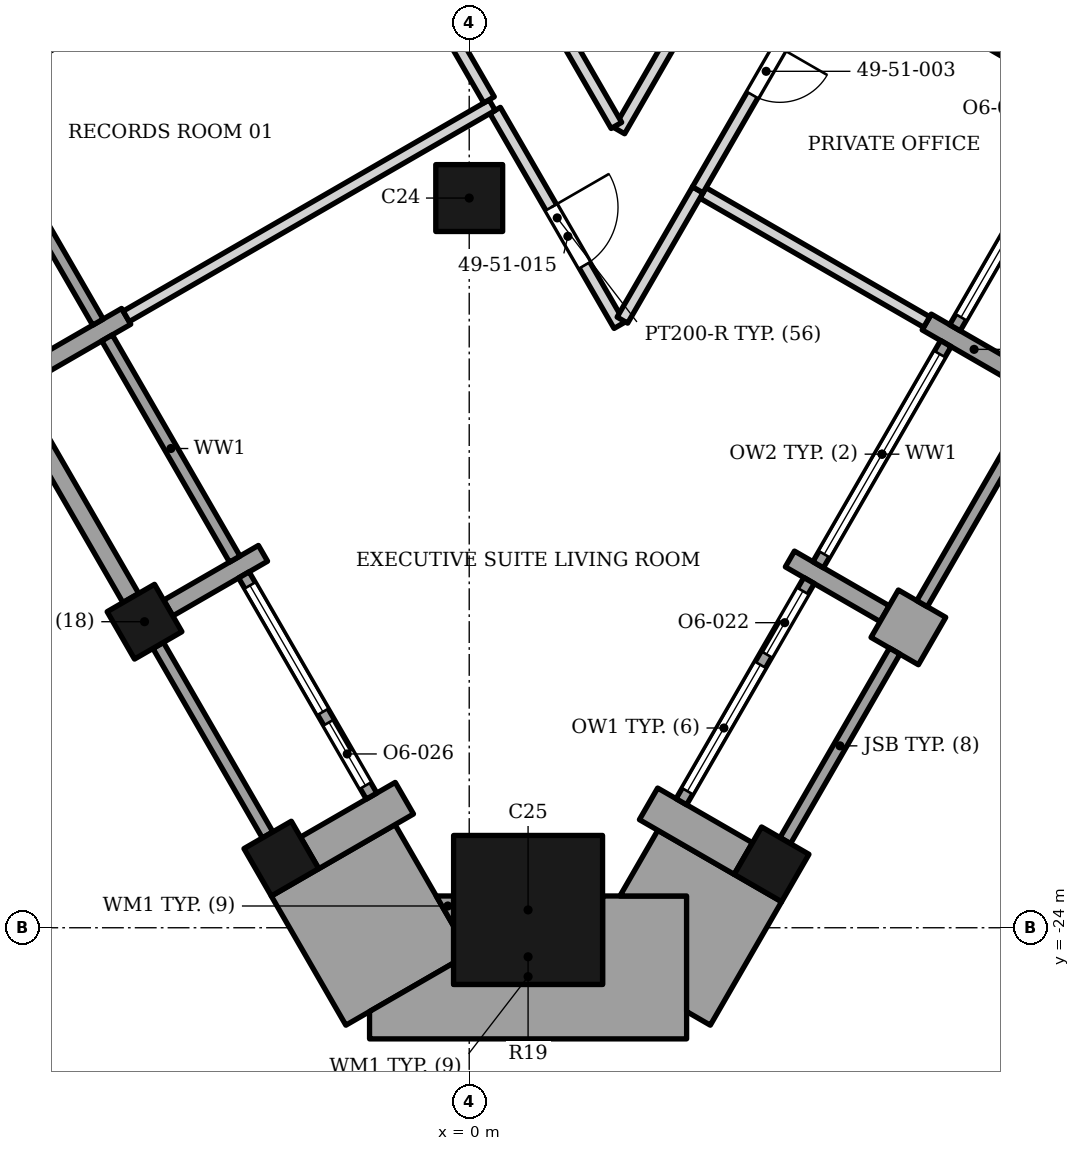
"""IFC4 building model, lengths in metres.
Left out: names, types, materials, properties, quantities, classifications, styles, units other than length and angle.
Written with IfcOpenShell. Run it as: python <this file> out.ifc"""

import sys

from ifc_helpers import new_model, si_unit, direction, frame, frame_2d, origin, origin_2d, place, context, subcontext, project, spatial, polyline, rectangle, outline, extrude, element, fill, save


model = new_model("IFC4")
c1 = context("Model", 3, precision=1e-05, world=origin(), true_north=direction((0.0, 1.0)))
c2 = subcontext(c1, "Body", "Model", "MODEL_VIEW")
j1 = project(units=[si_unit("LENGTHUNIT", "METRE"), si_unit("PLANEANGLEUNIT", "RADIAN")], contexts=[c1])
p1 = place(None, origin())
s1 = spatial("IfcSite", under=j1, at=p1, CompositionType="ELEMENT")
p2 = place(p1, origin())
s2 = spatial("IfcBuilding", under=s1, at=p2, CompositionType="ELEMENT")
p3 = place(p2, frame((0.0, 0.0, 208.1)))
s3 = spatial("IfcBuildingStorey", under=s2, at=p3, CompositionType="ELEMENT", Elevation=208.1)
p4 = place(p3, frame((0.968, -23.707, 0.0), z_axis=(0.0, 0.0, 1.0), x_axis=(0.0, 1.0, 0.0)))
e1 = element("IfcColumn", 1, at=p4, inside=s3, PredefinedType="COLUMN", context=c2, shape_type="SweptSolid", body=[
    extrude(rectangle(XDim=2.45, YDim=2.45, at=origin_2d()), origin(), (0.0, 0.0, 1.0), 3.9),
])
p5 = place(p3, frame((0.0, -12.0, 0.0), z_axis=(0.0, 0.0, 1.0), x_axis=(1.0, 0.0, 0.0)))
e2 = element("IfcColumn", 2, at=p5, inside=s3, PredefinedType="COLUMN", context=c2, shape_type="SweptSolid", body=[
    extrude(rectangle(XDim=1.1, YDim=1.1, at=origin_2d()), origin(), (0.0, 0.0, 1.0), 3.9),
])
for number, where, z_axis, x_axis in (
    (3, (-5.34, -18.967, 0.0), (0.0, 0.0, 1.0), (0.5, -0.866, 0.0)),
    (4, (-3.09, -22.863, 0.0), (0.0, 0.0, 1.0), (0.5, -0.866, 0.0)),
    (5, (4.973, -22.957, 0.0), (0.0, 0.0, 1.0), (0.5, 0.866, 0.0)),
):
    element("IfcColumn", number, at=place(p3, frame(where, z_axis=z_axis, x_axis=x_axis)), inside=s3, PredefinedType="COLUMN", context=c2, shape_type="SweptSolid", body=[
        extrude(rectangle(XDim=0.9, YDim=0.9, at=origin_2d()), origin(), (0.0, 0.0, 1.0), 3.9),
    ])
p6 = place(p3, frame((-7.2, -14.845, 0.0), z_axis=(0.0, 0.0, 1.0), x_axis=(0.865989075817, 0.500062916607, 0.0)))
e6 = element("IfcWall", 6, at=p6, inside=s3, PredefinedType="SOLIDWALL", context=c2, shape_type="SweptSolid", body=[
    extrude(rectangle(XDim=1.8, YDim=0.3, at=frame_2d((0.9, 0.0))), origin(), (0.0, 0.0, 1.0), 3.0),
])
p7 = place(p3, frame((-4.95, -18.742, 0.0), z_axis=(0.0, 0.0, 1.0), x_axis=(0.866013897511, 0.50001992892, 0.0)))
e7 = element("IfcWall", 7, at=p7, inside=s3, PredefinedType="SOLIDWALL", context=c2, shape_type="SweptSolid", body=[
    extrude(rectangle(XDim=1.8, YDim=0.3, at=frame_2d((0.9, 0.0))), origin(), (0.0, 0.0, 1.0), 3.0),
])
p8 = place(p3, frame((-1.066, -21.869, 0.0), z_axis=(0.0, 0.0, 1.0), x_axis=(-0.865989075817, -0.500062916607, 0.0)))
e8 = element("IfcWall", 8, at=p8, inside=s3, PredefinedType="SOLIDWALL", context=c2, shape_type="SweptSolid", body=[
    extrude(rectangle(XDim=1.8, YDim=0.6, at=frame_2d((0.9, 0.0))), origin(), (0.0, 0.0, 1.0), 3.0),
])
p9 = place(p3, frame((-8.206, -10.403, 0.0), z_axis=(0.0, 0.0, 1.0), x_axis=(0.500002543286, -0.866023935413, 0.0)))
e9 = element("IfcWall", 9, at=p9, inside=s3, PredefinedType="ELEMENTEDWALL", context=c2, shape_type="SweptSolid", body=[
    extrude(rectangle(XDim=4.2, YDim=0.2, at=frame_2d((2.1, 0.0))), origin(), (0.0, 0.0, 1.0), 2.95),
])
p10 = place(p3, frame((-5.565, -18.577, 0.0), z_axis=(0.0, 0.0, 1.0), x_axis=(-0.499990559667, 0.866030854095, 0.0)))
e10 = element("IfcWall", 10, at=p10, inside=s3, PredefinedType="SOLIDWALL", context=c2, shape_type="SweptSolid", body=[
    extrude(rectangle(XDim=3.6, YDim=0.3, at=frame_2d((1.8, 0.0))), origin(), (0.0, 0.0, 1.0), 3.0),
])
p11 = place(p3, frame((-5.956, -14.3, 0.0), z_axis=(0.0, 0.0, 1.0), x_axis=(0.500027713859, -0.866009402589, 0.0)))
e11 = element("IfcWall", 11, at=p11, inside=s3, PredefinedType="ELEMENTEDWALL", context=c2, shape_type="SweptSolid", body=[
    extrude(rectangle(XDim=4.2, YDim=0.2, at=frame_2d((2.1, 0.0))), origin(), (0.0, 0.0, 1.0), 3.0),
])
p12 = place(p3, origin())
e12 = element("IfcWall", 12, at=p12, inside=s3, PredefinedType="SOLIDWALL", context=c2, shape_type="SweptSolid", body=[
    extrude(outline(polyline([(-5.202, -19.407), (-3.402, -22.524), (-3.229, -22.424), (-5.029, -19.307), (-5.202, -19.407)])), origin(), (0.0, 0.0, 1.0), 3.0),
])
p13 = place(p3, frame((-3.706, -18.197, 0.0), z_axis=(0.0, 0.0, 1.0), x_axis=(0.500002543286, -0.866023935413, 0.0)))
e13 = element("IfcWall", 13, at=p13, inside=s3, PredefinedType="ELEMENTEDWALL", context=c2, shape_type="SweptSolid", body=[
    extrude(rectangle(XDim=4.2, YDim=0.2, at=frame_2d((2.1, 0.0))), origin(), (0.0, 0.0, 1.0), 3.0),
])
p14 = place(p13, frame((0.2, 0.0, 0.45)))
e14 = element("IfcOpeningElement", 14, at=p14, cuts=e13, PredefinedType="OPENING", context=c2, shape_type="SweptSolid", body=[
    extrude(rectangle(XDim=2.4, YDim=2.25, at=frame_2d((1.2, 1.125))), frame((0.0, 0.11, 0.0), z_axis=(0.0, -1.0, 0.0), x_axis=(1.0, 0.0, 0.0)), (0.0, 0.0, 1.0), 0.22),
])
p15 = place(p13, frame((2.8, 0.0, 0.0)))
e15 = element("IfcOpeningElement", 15, at=p15, cuts=e13, PredefinedType="OPENING", context=c2, shape_type="SweptSolid", body=[
    extrude(rectangle(XDim=1.2, YDim=2.7, at=frame_2d((0.6, 1.35))), frame((0.0, 0.11, 0.0), z_axis=(0.0, -1.0, 0.0), x_axis=(1.0, 0.0, 0.0)), (0.0, 0.0, 1.0), 0.22),
])
p16 = place(p3, frame((4.508, -22.862, 0.0), z_axis=(0.0, 0.0, 1.0), x_axis=(-0.866047807691, 0.499961193289, 0.0)))
e16 = element("IfcWall", 16, at=p16, inside=s3, PredefinedType="SOLIDWALL", context=c2, shape_type="SweptSolid", body=[
    extrude(rectangle(XDim=1.8, YDim=0.6, at=frame_2d((0.9, 0.0))), origin(), (0.0, 0.0, 1.0), 3.0),
])
p17 = place(p3, frame((7.612, -19.285, 0.0), z_axis=(0.0, 0.0, 1.0), x_axis=(-0.866081705922, 0.499902469156, 0.0)))
e17 = element("IfcWall", 17, at=p17, inside=s3, PredefinedType="SOLIDWALL", context=c2, shape_type="SweptSolid", body=[
    extrude(rectangle(XDim=0.9, YDim=0.9, at=frame_2d((0.45, 0.0))), origin(), (0.0, 0.0, 1.0), 3.0),
])
for number, where, z_axis, x_axis in (
    (18, (6.833, -18.835, 0.0), (0.0, 0.0, 1.0), (-0.866, 0.5, 0.0)),
    (19, (9.083, -14.938, 0.0), (0.0, 0.0, 1.0), (-0.866, 0.5, 0.0)),
):
    element("IfcWall", number, at=place(p3, frame(where, z_axis=z_axis, x_axis=x_axis)), inside=s3, PredefinedType="SOLIDWALL", context=c2, shape_type="SweptSolid", body=[
        extrude(rectangle(XDim=1.8, YDim=0.3, at=frame_2d((0.9, 0.0))), origin(), (0.0, 0.0, 1.0), 3.0),
    ])
p18 = place(p3, origin())
e20 = element("IfcWall", 20, at=p18, inside=s3, PredefinedType="SOLIDWALL", context=c2, shape_type="SweptSolid", body=[
    extrude(outline(polyline([(6.911, -19.4), (5.111, -22.517), (5.284, -22.617), (7.084, -19.5), (6.911, -19.4)])), origin(), (0.0, 0.0, 1.0), 3.0),
])
p19 = place(p3, frame((3.489, -21.927, 0.0), z_axis=(0.0, 0.0, 1.0), x_axis=(0.500027713859, 0.866009402589, 0.0)))
e21 = element("IfcWall", 21, at=p19, inside=s3, PredefinedType="ELEMENTEDWALL", context=c2, shape_type="SweptSolid", body=[
    extrude(rectangle(XDim=4.2, YDim=0.2, at=frame_2d((2.1, 0.0))), origin(), (0.0, 0.0, 1.0), 3.0),
])
p20 = place(p19, frame((0.2, 0.0, 0.45)))
e22 = element("IfcOpeningElement", 22, at=p20, cuts=e21, PredefinedType="OPENING", context=c2, shape_type="SweptSolid", body=[
    extrude(rectangle(XDim=2.4, YDim=2.25, at=frame_2d((1.2, 1.125))), frame((0.0, 0.11, 0.0), z_axis=(0.0, -1.0, 0.0), x_axis=(1.0, 0.0, 0.0)), (0.0, 0.0, 1.0), 0.22),
])
p21 = place(p19, frame((2.8, 0.0, 0.0)))
e23 = element("IfcOpeningElement", 23, at=p21, cuts=e21, PredefinedType="OPENING", context=c2, shape_type="SweptSolid", body=[
    extrude(rectangle(XDim=1.2, YDim=2.7, at=frame_2d((0.6, 1.35))), frame((0.0, 0.11, 0.0), z_axis=(0.0, -1.0, 0.0), x_axis=(1.0, 0.0, 0.0)), (0.0, 0.0, 1.0), 0.22),
])
p22 = place(p3, frame((7.448, -18.671, 0.0), z_axis=(0.0, 0.0, 1.0), x_axis=(0.500012057535, 0.866018442252, 0.0)))
e24 = element("IfcWall", 24, at=p22, inside=s3, PredefinedType="SOLIDWALL", context=c2, shape_type="SweptSolid", body=[
    extrude(rectangle(XDim=3.6, YDim=0.2, at=frame_2d((1.8, 0.0))), origin(), (0.0, 0.0, 1.0), 3.0),
])
p23 = place(p3, frame((5.739, -18.031, 0.0), z_axis=(0.0, 0.0, 1.0), x_axis=(0.500002543286, 0.866023935413, 0.0)))
e25 = element("IfcWall", 25, at=p23, inside=s3, PredefinedType="ELEMENTEDWALL", context=c2, shape_type="SweptSolid", body=[
    extrude(rectangle(XDim=4.2, YDim=0.2, at=frame_2d((2.1, 0.0))), origin(), (0.0, 0.0, 1.0), 3.0),
])
p24 = place(p23, frame((0.2, 0.0, 0.45)))
e26 = element("IfcOpeningElement", 26, at=p24, cuts=e25, PredefinedType="OPENING", context=c2, shape_type="SweptSolid", body=[
    extrude(rectangle(XDim=3.8, YDim=2.25, at=frame_2d((1.9, 1.125))), frame((0.0, 0.11, 0.0), z_axis=(0.0, -1.0, 0.0), x_axis=(1.0, 0.0, 0.0)), (0.0, 0.0, 1.0), 0.22),
])
p25 = place(p3, frame((7.989, -14.133, 0.0), z_axis=(0.0, 0.0, 1.0), x_axis=(0.500027713859, 0.866009402589, 0.0)))
e27 = element("IfcWall", 27, at=p25, inside=s3, PredefinedType="ELEMENTEDWALL", context=c2, shape_type="SweptSolid", body=[
    extrude(rectangle(XDim=4.2, YDim=0.2, at=frame_2d((2.1, 0.0))), origin(), (0.0, 0.0, 1.0), 2.95),
])
p26 = place(p25, frame((0.2, 0.0, 0.45)))
e28 = element("IfcOpeningElement", 28, at=p26, cuts=e27, PredefinedType="OPENING", context=c2, shape_type="SweptSolid", body=[
    extrude(rectangle(XDim=2.4, YDim=2.25, at=frame_2d((1.2, 1.125))), frame((0.0, 0.11, 0.0), z_axis=(0.0, -1.0, 0.0), x_axis=(1.0, 0.0, 0.0)), (0.0, 0.0, 1.0), 0.22),
])
p27 = place(p25, frame((2.8, 0.0, 0.0)))
e29 = element("IfcOpeningElement", 29, at=p27, cuts=e27, PredefinedType="OPENING", context=c2, shape_type="SweptSolid", body=[
    extrude(rectangle(XDim=1.2, YDim=2.7, at=frame_2d((0.6, 1.35))), frame((0.0, 0.11, 0.0), z_axis=(0.0, -1.0, 0.0), x_axis=(1.0, 0.0, 0.0)), (0.0, 0.0, 1.0), 0.22),
])
p28 = place(p3, origin())
e30 = element("IfcWall", 30, at=p28, inside=s3, PredefinedType="SOLIDWALL", context=c2, shape_type="SweptSolid", body=[
    extrude(outline(polyline([(-0.257, -23.972), (-1.219, -22.304), (-3.255, -23.479), (-2.029, -25.603), (-0.257, -24.58), (-0.257, -23.972)])), origin(), (0.0, 0.0, 1.0), 3.0),
])
p29 = place(p3, origin())
e31 = element("IfcWall", 31, at=p29, inside=s3, PredefinedType="SOLIDWALL", context=c2, shape_type="SweptSolid", body=[
    extrude(outline(polyline([(2.193, -23.478), (2.193, -24.932), (-0.257, -24.932), (-0.257, -24.58), (-1.639, -25.378), (-1.639, -25.828), (3.575, -25.828), (3.575, -23.478), (2.193, -23.478)])), origin(), (0.0, 0.0, 1.0), 3.0),
])
p30 = place(p3, origin())
e32 = element("IfcWall", 32, at=p30, inside=s3, PredefinedType="SOLIDWALL", context=c2, shape_type="SweptSolid", body=[
    extrude(outline(polyline([(-0.542, -23.478), (-0.257, -23.972), (-0.257, -23.478), (-0.542, -23.478)])), origin(), (0.0, 0.0, 1.0), 3.0),
])
p31 = place(p3, origin())
e33 = element("IfcWall", 33, at=p31, inside=s3, PredefinedType="SOLIDWALL", context=c2, shape_type="SweptSolid", body=[
    extrude(outline(polyline([(5.137, -23.572), (3.102, -22.397), (2.478, -23.478), (3.575, -23.478), (3.575, -25.378), (3.965, -25.603), (5.137, -23.572)])), origin(), (0.0, 0.0, 1.0), 3.0),
])
p32 = place(p3, frame((0.426, -10.558, 0.0), z_axis=(0.0, 0.0, 1.0), x_axis=(0.500350308999, -0.865823058301, 0.0)))
e34 = element("IfcWall", 34, at=p32, inside=s3, PredefinedType="PARTITIONING", context=c2, shape_type="SweptSolid", body=[
    extrude(rectangle(XDim=4.083, YDim=0.2, at=frame_2d((2.042, 0.0))), origin(), (0.0, 0.0, 1.0), 2.95),
])
p33 = place(p32, frame((1.842, 0.0, 0.0)))
e35 = element("IfcOpeningElement", 35, at=p33, cuts=e34, PredefinedType="OPENING", context=c2, shape_type="SweptSolid", body=[
    extrude(rectangle(XDim=1.1, YDim=2.1, at=frame_2d((0.55, 1.05))), frame((0.0, 0.11, 0.0), z_axis=(0.0, -1.0, 0.0), x_axis=(1.0, 0.0, 0.0)), (0.0, 0.0, 1.0), 0.22),
])
p34 = place(p3, frame((3.843, -11.915, 0.0), z_axis=(0.0, 0.0, 1.0), x_axis=(0.866177933903, -0.499735716973, 0.0)))
e36 = element("IfcWall", 36, at=p34, inside=s3, PredefinedType="PARTITIONING", context=c2, shape_type="SweptSolid", body=[
    extrude(rectangle(XDim=4.249, YDim=0.2, at=frame_2d((2.125, 0.0))), origin(), (0.0, 0.0, 1.0), 2.95),
])
p35 = place(p3, frame((2.519, -14.007, 0.0), z_axis=(0.0, 0.0, 1.0), x_axis=(0.500678517204, 0.865633307128, 0.0)))
e37 = element("IfcWall", 37, at=p35, inside=s3, PredefinedType="PARTITIONING", context=c2, shape_type="SweptSolid", body=[
    extrude(rectangle(XDim=2.475, YDim=0.2, at=frame_2d((1.238, 0.0))), origin(), (0.0, 0.0, 1.0), 2.95),
])
p36 = place(p3, frame((2.469, -10.893, 0.0), z_axis=(0.0, 0.0, 1.0), x_axis=(0.499769731946, 0.866158308296, 0.0)))
e38 = element("IfcWall", 38, at=p36, inside=s3, PredefinedType="PARTITIONING", context=c2, shape_type="SweptSolid", body=[
    extrude(rectangle(XDim=13.113, YDim=0.2, at=frame_2d((6.557, 0.0))), origin(), (0.0, 0.0, 1.0), 2.884),
])
p37 = place(p36, frame((3.048, 0.0, 0.0)))
e39 = element("IfcOpeningElement", 39, at=p37, cuts=e38, PredefinedType="OPENING", context=c2, shape_type="SweptSolid", body=[
    extrude(rectangle(XDim=0.9, YDim=2.1, at=frame_2d((0.45, 1.05))), frame((0.0, 0.11, 0.0), z_axis=(0.0, -1.0, 0.0), x_axis=(1.0, 0.0, 0.0)), (0.0, 0.0, 1.0), 0.22),
])
p38 = place(p36, frame((9.556, 0.0, 0.0)))
e40 = element("IfcOpeningElement", 40, at=p38, cuts=e38, PredefinedType="OPENING", context=c2, shape_type="SweptSolid", body=[
    extrude(rectangle(XDim=1.0, YDim=2.1, at=frame_2d((0.5, 1.05))), frame((0.0, 0.11, 0.0), z_axis=(0.0, -1.0, 0.0), x_axis=(1.0, 0.0, 0.0)), (0.0, 0.0, 1.0), 0.22),
])
p39 = place(p3, frame((-5.641, -13.946, 0.0), z_axis=(0.0, 0.0, 1.0), x_axis=(0.866131772529, 0.499815718657, 0.0)))
e41 = element("IfcWall", 41, at=p39, inside=s3, PredefinedType="PARTITIONING", context=c2, shape_type="SweptSolid", body=[
    extrude(rectangle(XDim=6.949, YDim=0.2, at=frame_2d((3.475, 0.0))), origin(), (0.0, 0.0, 1.0), 2.884),
])
p40 = place(p3, frame((-1.873, -6.576, 0.0), z_axis=(0.0, 0.0, 1.0), x_axis=(0.499989943423, -0.866031209874, 0.0)))
e42 = element("IfcWall", 42, at=p40, inside=s3, PredefinedType="PARTITIONING", context=c2, shape_type="SweptSolid", body=[
    extrude(rectangle(XDim=4.398, YDim=0.2, at=frame_2d((2.199, 0.0))), origin(), (0.0, 0.0, 1.0), 2.884),
])
p41 = place(p40, frame((1.798, 0.0, 0.0)))
e43 = element("IfcOpeningElement", 43, at=p41, cuts=e42, PredefinedType="OPENING", context=c2, shape_type="SweptSolid", body=[
    extrude(rectangle(XDim=0.9, YDim=2.1, at=frame_2d((0.45, 1.05))), frame((0.0, 0.11, 0.0), z_axis=(0.0, -1.0, 0.0), x_axis=(1.0, 0.0, 0.0)), (0.0, 0.0, 1.0), 0.22),
])
p42 = place(p3, frame((6.094, -8.014, 0.0), z_axis=(0.0, 0.0, 1.0), x_axis=(0.865797051121, -0.50039531, 0.0)))
e44 = element("IfcWall", 44, at=p42, inside=s3, PredefinedType="PARTITIONING", context=c2, shape_type="SweptSolid", body=[
    extrude(rectangle(XDim=4.25, YDim=0.2, at=frame_2d((2.125, 0.0))), origin(), (0.0, 0.0, 1.0), 3.052),
])
p43 = place(p3, frame((-7.891, -10.048, 0.0), z_axis=(0.0, 0.0, 1.0), x_axis=(0.866160062832, 0.499766691121, 0.0)))
e45 = element("IfcWall", 45, at=p43, inside=s3, PredefinedType="PARTITIONING", context=c2, shape_type="SweptSolid", body=[
    extrude(rectangle(XDim=6.848, YDim=0.2, at=frame_2d((3.424, 0.0))), origin(), (0.0, 0.0, 1.0), 2.884),
])
p44 = place(p3, frame((3.759, -11.864, 0.0), z_axis=(0.0, 0.0, 1.0), x_axis=(0.499997969693, 0.866026575979, 0.0)))
e46 = element("IfcWall", 46, at=p44, inside=s3, PredefinedType="PARTITIONING", context=c2, shape_type="SweptSolid", body=[
    extrude(rectangle(XDim=13.5, YDim=0.2, at=frame_2d((6.75, 0.0))), origin(), (0.0, 0.0, 1.0), 2.884),
])
p45 = place(p44, frame((1.8, 0.0, 0.0)))
e47 = element("IfcOpeningElement", 47, at=p45, cuts=e46, PredefinedType="OPENING", context=c2, shape_type="SweptSolid", body=[
    extrude(rectangle(XDim=0.9, YDim=2.1, at=frame_2d((0.45, 1.05))), frame((0.0, 0.11, 0.0), z_axis=(0.0, -1.0, 0.0), x_axis=(1.0, 0.0, 0.0)), (0.0, 0.0, 1.0), 0.22),
])
p46 = place(p44, frame((8.5, 0.0, 0.0)))
e48 = element("IfcOpeningElement", 48, at=p46, cuts=e46, PredefinedType="OPENING", context=c2, shape_type="SweptSolid", body=[
    extrude(rectangle(XDim=1.0, YDim=2.4, at=frame_2d((0.5, 1.2))), frame((0.0, 0.11, 0.0), z_axis=(0.0, -1.0, 0.0), x_axis=(1.0, 0.0, 0.0)), (0.0, 0.0, 1.0), 0.22),
])
p47 = place(p3, frame((-4.086, 0.464, 0.0), z_axis=(0.0, 0.0, 1.0), x_axis=(0.499999074482, -0.866025938132, 0.0)))
e49 = element("IfcWall", 49, at=p47, inside=s3, PredefinedType="PARTITIONING", context=c2, shape_type="SweptSolid", body=[
    extrude(rectangle(XDim=13.013, YDim=0.2, at=frame_2d((6.507, 0.0))), origin(), (0.0, 0.0, 1.0), 2.884),
])
p48 = place(p47, frame((2.607, 0.0, 0.0)))
e50 = element("IfcOpeningElement", 50, at=p48, cuts=e49, PredefinedType="OPENING", context=c2, shape_type="SweptSolid", body=[
    extrude(rectangle(XDim=0.9, YDim=2.1, at=frame_2d((0.45, 1.05))), frame((0.0, 0.11, 0.0), z_axis=(0.0, -1.0, 0.0), x_axis=(1.0, 0.0, 0.0)), (0.0, 0.0, 1.0), 0.22),
])
p49 = place(p14, origin())
e51 = element("IfcWindow", 51, at=p49, inside=s3, PartitioningType="SINGLE_PANEL", PredefinedType="WINDOW", context=c2, shape_type="SweptSolid", body=[
    extrude(rectangle(XDim=2.4, YDim=2.25, at=frame_2d((1.2, 1.125))), frame((0.0, 0.03, 0.0), z_axis=(0.0, -1.0, 0.0), x_axis=(1.0, 0.0, 0.0)), (0.0, 0.0, 1.0), 0.06),
])
fill(e14, e51)
p50 = place(p15, origin())
e52 = element("IfcDoor", 52, at=p50, inside=s3, OperationType="SINGLE_SWING_LEFT", PredefinedType="DOOR", context=c2, shape_type="SweptSolid", body=[
    extrude(rectangle(XDim=1.2, YDim=2.7, at=frame_2d((0.6, 1.35))), frame((0.0, 0.025, 0.0), z_axis=(0.0, -1.0, 0.0), x_axis=(1.0, 0.0, 0.0)), (0.0, 0.0, 1.0), 0.05),
])
fill(e15, e52)
p51 = place(p20, origin())
e53 = element("IfcWindow", 53, at=p51, inside=s3, PartitioningType="SINGLE_PANEL", PredefinedType="WINDOW", context=c2, shape_type="SweptSolid", body=[
    extrude(rectangle(XDim=2.4, YDim=2.25, at=frame_2d((1.2, 1.125))), frame((0.0, 0.03, 0.0), z_axis=(0.0, -1.0, 0.0), x_axis=(1.0, 0.0, 0.0)), (0.0, 0.0, 1.0), 0.06),
])
fill(e22, e53)
p52 = place(p21, origin())
e54 = element("IfcDoor", 54, at=p52, inside=s3, OperationType="SINGLE_SWING_LEFT", PredefinedType="DOOR", context=c2, shape_type="SweptSolid", body=[
    extrude(rectangle(XDim=1.2, YDim=2.7, at=frame_2d((0.6, 1.35))), frame((0.0, 0.025, 0.0), z_axis=(0.0, -1.0, 0.0), x_axis=(1.0, 0.0, 0.0)), (0.0, 0.0, 1.0), 0.05),
])
fill(e23, e54)
p53 = place(p24, origin())
e55 = element("IfcWindow", 55, at=p53, inside=s3, PartitioningType="SINGLE_PANEL", PredefinedType="WINDOW", context=c2, shape_type="SweptSolid", body=[
    extrude(rectangle(XDim=3.8, YDim=2.25, at=frame_2d((1.9, 1.125))), frame((0.0, 0.03, 0.0), z_axis=(0.0, -1.0, 0.0), x_axis=(1.0, 0.0, 0.0)), (0.0, 0.0, 1.0), 0.06),
])
fill(e26, e55)
p54 = place(p26, origin())
e56 = element("IfcWindow", 56, at=p54, inside=s3, PartitioningType="SINGLE_PANEL", PredefinedType="WINDOW", context=c2, shape_type="SweptSolid", body=[
    extrude(rectangle(XDim=2.4, YDim=2.25, at=frame_2d((1.2, 1.125))), frame((0.0, 0.03, 0.0), z_axis=(0.0, -1.0, 0.0), x_axis=(1.0, 0.0, 0.0)), (0.0, 0.0, 1.0), 0.06),
])
fill(e28, e56)
p55 = place(p45, origin())
e57 = element("IfcDoor", 57, at=p55, inside=s3, OperationType="SINGLE_SWING_RIGHT", PredefinedType="DOOR", context=c2, shape_type="SweptSolid", body=[
    extrude(rectangle(XDim=0.9, YDim=2.1, at=frame_2d((0.45, 1.05))), frame((0.0, 0.025, 0.0), z_axis=(0.0, -1.0, 0.0), x_axis=(1.0, 0.0, 0.0)), (0.0, 0.0, 1.0), 0.05),
])
fill(e47, e57)
p56 = place(p33, origin())
e58 = element("IfcDoor", 58, at=p56, inside=s3, OperationType="SINGLE_SWING_LEFT", PredefinedType="DOOR", context=c2, shape_type="SweptSolid", body=[
    extrude(rectangle(XDim=1.1, YDim=2.1, at=frame_2d((0.55, 1.05))), frame((0.0, 0.025, 0.0), z_axis=(0.0, -1.0, 0.0), x_axis=(1.0, 0.0, 0.0)), (0.0, 0.0, 1.0), 0.05),
])
fill(e35, e58)
save(model, sys.argv[1])
